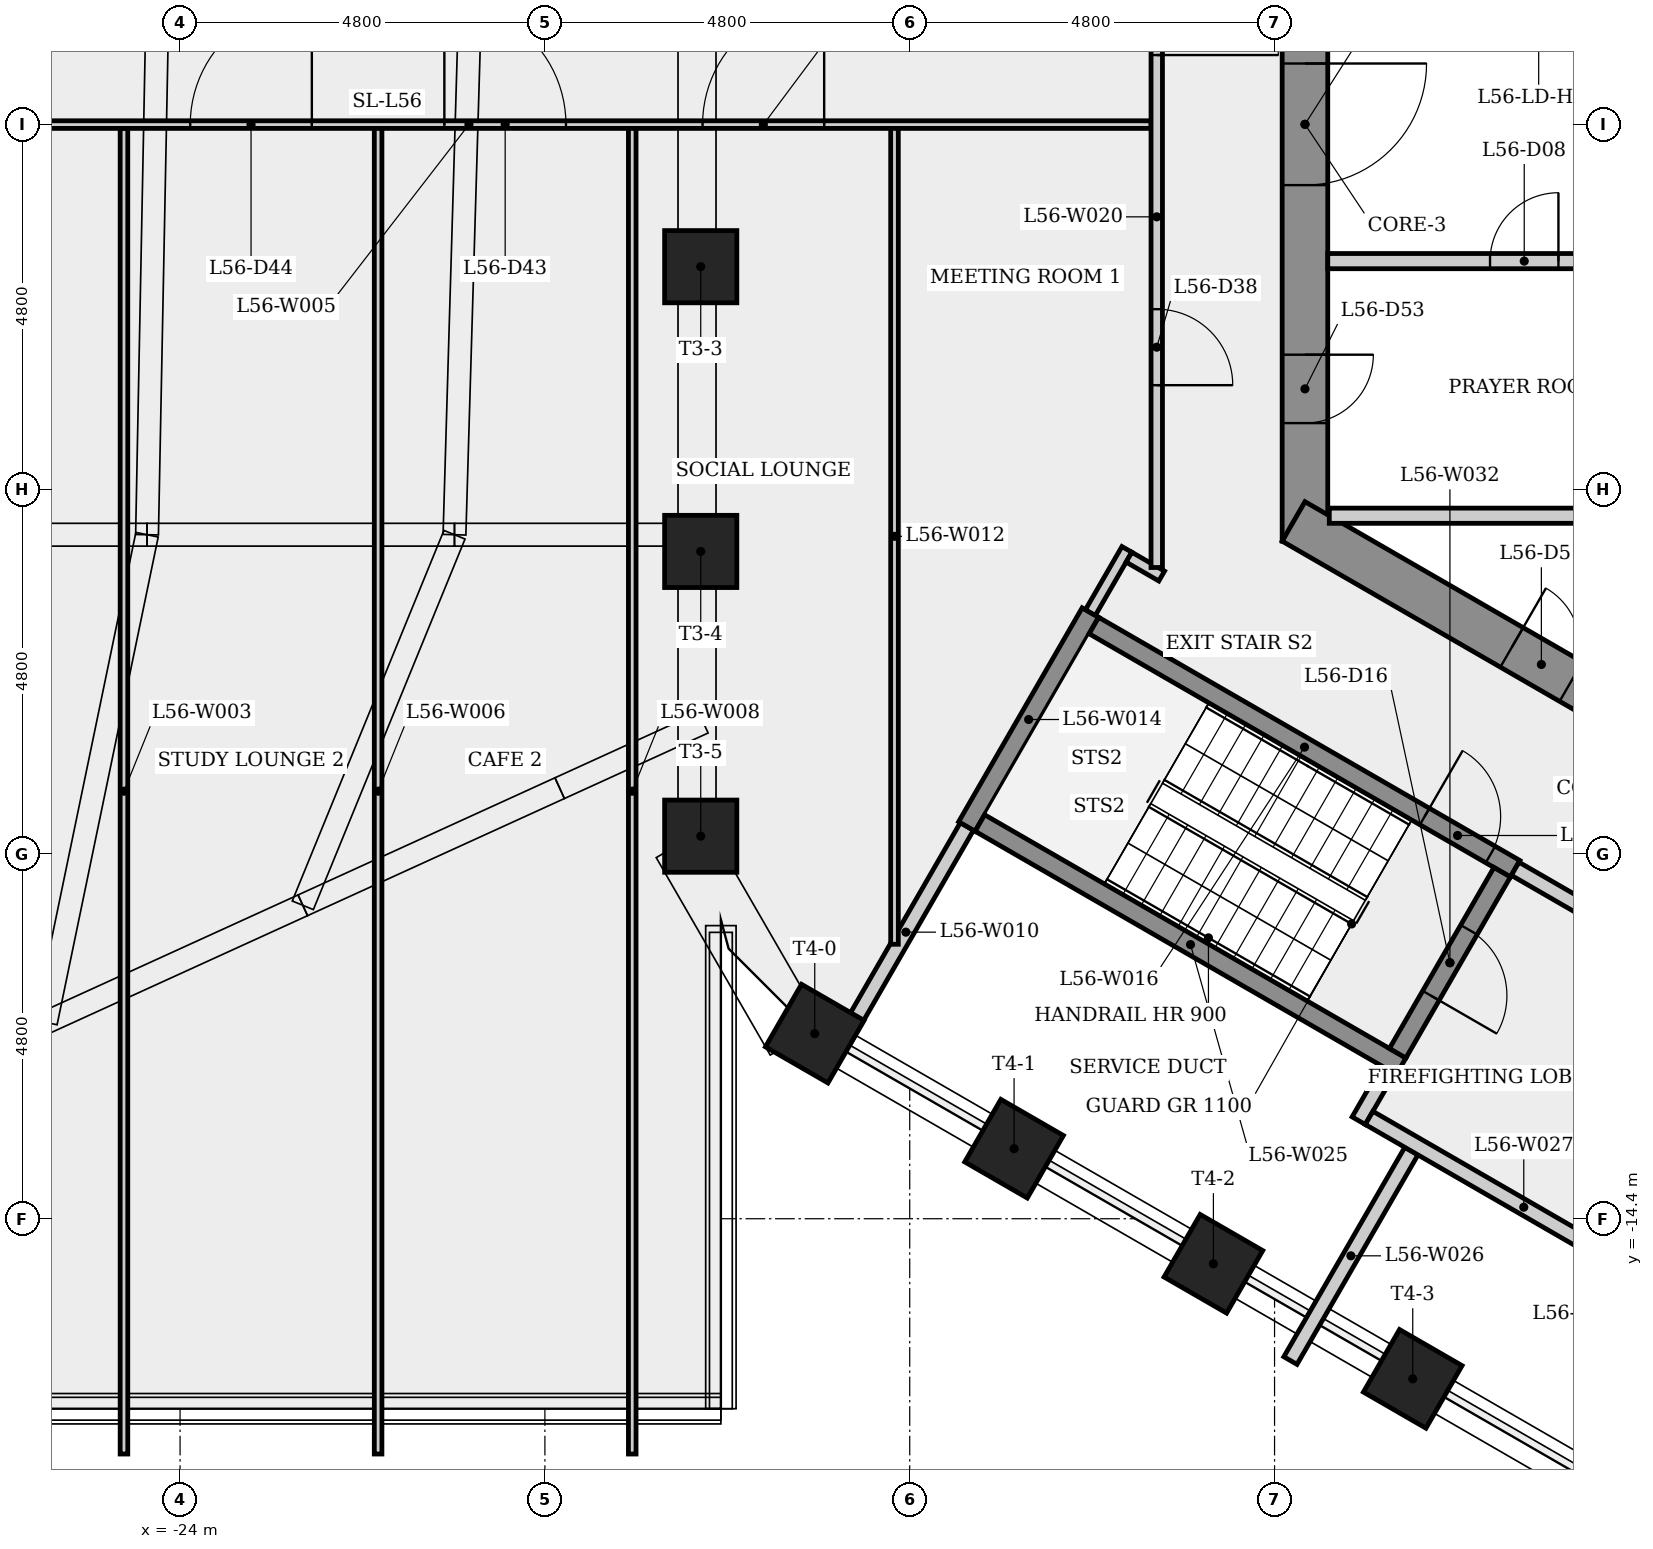
"""IFC4 building model, lengths in metres.
Left out: names, types, materials, properties, quantities, classifications, styles, units other than length and angle.
Written with IfcOpenShell. Run it as: python <this file> out.ifc"""

import sys

from ifc_helpers import new_model, si_unit, direction, frame, frame_2d, origin, origin_2d, place, context, subcontext, project, spatial, rectangle, extrude, element, fill, save


model = new_model("IFC4")
c1 = context("Model", 3, precision=1e-05, world=origin(), true_north=direction((0.0, 1.0)))
c2 = subcontext(c1, "Body", "Model", "MODEL_VIEW")
j1 = project(units=[si_unit("LENGTHUNIT", "METRE"), si_unit("PLANEANGLEUNIT", "RADIAN")], contexts=[c1])
p1 = place(None, origin())
s1 = spatial("IfcSite", under=j1, at=p1, CompositionType="ELEMENT")
p2 = place(p1, origin())
s2 = spatial("IfcBuilding", under=s1, at=p2, CompositionType="ELEMENT")
p3 = place(p2, frame((0.0, 0.0, 210.1)))
s3 = spatial("IfcBuildingStorey", under=s2, at=p3, CompositionType="ELEMENT", Elevation=210.1)
p4 = place(p3, frame((-9.2, 5.485, 0.0), z_axis=(0.0, 0.0, 1.0), x_axis=(0.0, -1.0, 0.0)))
e1 = element("IfcWall", 1, at=p4, inside=s3, PredefinedType="SHEAR", context=c2, shape_type="SweptSolid", body=[
    extrude(rectangle(XDim=10.97, YDim=0.6, at=frame_2d((5.485, 0.0))), origin(), (0.0, 0.0, 1.0), 4.0),
])
p5 = place(p4, frame((8.516, 0.0, 0.0)))
e2 = element("IfcOpeningElement", 2, at=p5, cuts=e1, PredefinedType="OPENING", context=c2, shape_type="SweptSolid", body=[
    extrude(rectangle(XDim=0.9, YDim=2.1, at=frame_2d((0.45, 1.05))), frame((0.0, 0.31, 0.0), z_axis=(0.0, -1.0, 0.0), x_axis=(1.0, 0.0, 0.0)), (0.0, 0.0, 1.0), 0.62),
])
p6 = place(p4, frame((4.685, 0.0, 0.0)))
e3 = element("IfcOpeningElement", 3, at=p6, cuts=e1, PredefinedType="OPENING", context=c2, shape_type="SweptSolid", body=[
    extrude(rectangle(XDim=1.6, YDim=2.1, at=frame_2d((0.8, 1.05))), frame((0.0, 0.31, 0.0), z_axis=(0.0, -1.0, 0.0), x_axis=(1.0, 0.0, 0.0)), (0.0, 0.0, 1.0), 0.62),
])
p7 = place(p3, frame((-9.35, -5.225, 0.0), z_axis=(0.0, 0.0, 1.0), x_axis=(0.866023993627, -0.500002442456, 0.0)))
e4 = element("IfcWall", 4, at=p7, inside=s3, PredefinedType="SHEAR", context=c2, shape_type="SweptSolid", body=[
    extrude(rectangle(XDim=10.97, YDim=0.6, at=frame_2d((5.485, 0.0))), origin(), (0.0, 0.0, 1.0), 4.0),
])
p8 = place(p7, frame((3.315, 0.0, 0.0)))
e5 = element("IfcOpeningElement", 5, at=p8, cuts=e4, PredefinedType="OPENING", context=c2, shape_type="SweptSolid", body=[
    extrude(rectangle(XDim=0.9, YDim=2.1, at=frame_2d((0.45, 1.05))), frame((0.0, 0.31, 0.0), z_axis=(0.0, -1.0, 0.0), x_axis=(1.0, 0.0, 0.0)), (0.0, 0.0, 1.0), 0.62),
])
for number, where, z_axis, x_axis in (
    (6, (-17.15, -1.873, 0.0), (0.0, 0.0, 1.0), (-1.0, 0.0, 0.0)),
    (7, (-17.15, -5.62, 0.0), (0.0, 0.0, 1.0), (-1.0, 0.0, 0.0)),
    (8, (-17.15, -9.366, 0.0), (0.0, 0.0, 1.0), (-1.0, 0.0, 0.0)),
    (9, (-15.65, -11.965, 0.0), (0.0, 0.0, 1.0), (-0.5, -0.866, 0.0)),
    (10, (-13.027, -13.479, 0.0), (0.0, 0.0, 1.0), (-0.5, -0.866, 0.0)),
    (11, (-10.405, -14.993, 0.0), (0.0, 0.0, 1.0), (-0.5, -0.866, 0.0)),
    (12, (-7.782, -16.507, 0.0), (0.0, 0.0, 1.0), (-0.5, -0.866, 0.0)),
    (13, (-5.159, -18.021, 0.0), (0.0, 0.0, 1.0), (-0.5, -0.866, 0.0)),
):
    element("IfcColumn", number, at=place(p3, frame(where, z_axis=z_axis, x_axis=x_axis)), inside=s3, PredefinedType="COLUMN", context=c2, shape_type="SweptSolid", body=[
        extrude(rectangle(XDim=0.95, YDim=0.95, at=origin_2d()), origin(), (0.0, 0.0, 1.0), 4.0),
    ])
p9 = place(p3, frame((-24.738, -17.496, 0.0), z_axis=(0.0, 0.0, 1.0), x_axis=(0.0, 1.0, 0.0)))
e14 = element("IfcWall", 14, at=p9, inside=s3, PredefinedType="PARTITIONING", context=c2, shape_type="SweptSolid", body=[
    extrude(rectangle(XDim=17.442, YDim=0.1, at=frame_2d((8.721, 0.0))), origin(), (0.0, 0.0, 1.0), 3.275),
])
p10 = place(p3, frame((-29.174, -0.004, 0.0), z_axis=(0.0, 0.0, 1.0), x_axis=(1.0, 0.0, 0.0)))
e15 = element("IfcWall", 15, at=p10, inside=s3, PredefinedType="PARTITIONING", context=c2, shape_type="SweptSolid", body=[
    extrude(rectangle(XDim=17.949, YDim=0.1, at=frame_2d((8.975, 0.0))), origin(), (0.0, 0.0, 1.0), 3.6),
])
p11 = place(p10, frame((12.049, 0.0, 0.0)))
e16 = element("IfcOpeningElement", 16, at=p11, cuts=e15, PredefinedType="OPENING", context=c2, shape_type="SweptSolid", body=[
    extrude(rectangle(XDim=1.6, YDim=2.1, at=frame_2d((0.8, 1.05))), frame((0.0, 0.06, 0.0), z_axis=(0.0, -1.0, 0.0), x_axis=(1.0, 0.0, 0.0)), (0.0, 0.0, 1.0), 0.12),
])
p12 = place(p10, frame((8.652, 0.0, 0.0)))
e17 = element("IfcOpeningElement", 17, at=p12, cuts=e15, PredefinedType="OPENING", context=c2, shape_type="SweptSolid", body=[
    extrude(rectangle(XDim=1.6, YDim=2.1, at=frame_2d((0.8, 1.05))), frame((0.0, 0.06, 0.0), z_axis=(0.0, -1.0, 0.0), x_axis=(1.0, 0.0, 0.0)), (0.0, 0.0, 1.0), 0.12),
])
p13 = place(p10, frame((5.308, 0.0, 0.0)))
e18 = element("IfcOpeningElement", 18, at=p13, cuts=e15, PredefinedType="OPENING", context=c2, shape_type="SweptSolid", body=[
    extrude(rectangle(XDim=1.6, YDim=2.1, at=frame_2d((0.8, 1.05))), frame((0.0, 0.06, 0.0), z_axis=(0.0, -1.0, 0.0), x_axis=(1.0, 0.0, 0.0)), (0.0, 0.0, 1.0), 0.12),
])
p14 = place(p10, frame((1.403, 0.0, 0.0)))
e19 = element("IfcOpeningElement", 19, at=p14, cuts=e15, PredefinedType="OPENING", context=c2, shape_type="SweptSolid", body=[
    extrude(rectangle(XDim=1.6, YDim=2.1, at=frame_2d((0.8, 1.05))), frame((0.0, 0.06, 0.0), z_axis=(0.0, -1.0, 0.0), x_axis=(1.0, 0.0, 0.0)), (0.0, 0.0, 1.0), 0.12),
])
for number, where, z_axis, x_axis in (
    (20, (-21.394, -17.496, 0.0), (0.0, 0.0, 1.0), (0.0, 1.0, 0.0)),
    (21, (-18.051, -17.496, 0.0), (0.0, 0.0, 1.0), (0.0, 1.0, 0.0)),
):
    element("IfcWall", number, at=place(p3, frame(where, z_axis=z_axis, x_axis=x_axis)), inside=s3, PredefinedType="PARTITIONING", context=c2, shape_type="SweptSolid", body=[
        extrude(rectangle(XDim=17.442, YDim=0.1, at=frame_2d((8.721, 0.0))), origin(), (0.0, 0.0, 1.0), 3.6),
    ])
p15 = place(p3, frame((-15.254, -12.02, 0.0), z_axis=(0.0, 0.0, 1.0), x_axis=(0.499957148214, 0.866050142861, 0.0)))
e22 = element("IfcWall", 22, at=p15, inside=s3, PredefinedType="PLUMBINGWALL", context=c2, shape_type="SweptSolid", body=[
    extrude(rectangle(XDim=3.212, YDim=0.2, at=frame_2d((1.606, 0.0))), origin(), (0.0, 0.0, 1.0), 3.6),
])
p16 = place(p3, frame((-14.6, -10.789, 0.0), z_axis=(0.0, 0.0, 1.0), x_axis=(0.0, 1.0, 0.0)))
e23 = element("IfcWall", 23, at=p16, inside=s3, PredefinedType="PARTITIONING", context=c2, shape_type="SweptSolid", body=[
    extrude(rectangle(XDim=10.735, YDim=0.1, at=frame_2d((5.368, 0.0))), origin(), (0.0, 0.0, 1.0), 3.6),
])
p17 = place(p3, frame((-13.648, -9.239, 0.0), z_axis=(0.0, 0.0, 1.0), x_axis=(0.500017246033, 0.866015446554, 0.0)))
e24 = element("IfcWall", 24, at=p17, inside=s3, PredefinedType="SHEAR", context=c2, shape_type="SweptSolid", body=[
    extrude(rectangle(XDim=3.25, YDim=0.25, at=frame_2d((1.625, 0.0))), origin(), (0.0, 0.0, 1.0), 3.6),
])
p18 = place(p3, frame((-12.023, -6.424, 0.0), z_axis=(0.0, 0.0, 1.0), x_axis=(0.500023335103, 0.866011930837, 0.0)))
e25 = element("IfcWall", 25, at=p18, inside=s3, PredefinedType="PARTITIONING", context=c2, shape_type="SweptSolid", body=[
    extrude(rectangle(XDim=0.96, YDim=0.15, at=frame_2d((0.48, 0.0))), origin(), (0.0, 0.0, 1.0), 3.6),
])
p19 = place(p3, frame((-11.977, -6.595, 0.0), z_axis=(0.0, 0.0, 1.0), x_axis=(0.866025499775, -0.499999833739, 0.0)))
e26 = element("IfcWall", 26, at=p19, inside=s3, PredefinedType="SHEAR", context=c2, shape_type="SweptSolid", body=[
    extrude(rectangle(XDim=6.4, YDim=0.25, at=frame_2d((3.2, 0.0))), origin(), (0.0, 0.0, 1.0), 3.6),
])
p20 = place(p19, frame((5.025, 0.0, 0.0)))
e27 = element("IfcOpeningElement", 27, at=p20, cuts=e26, PredefinedType="OPENING", context=c2, shape_type="SweptSolid", body=[
    extrude(rectangle(XDim=1.0, YDim=2.1, at=frame_2d((0.5, 1.05))), frame((0.0, 0.135, 0.0), z_axis=(0.0, -1.0, 0.0), x_axis=(1.0, 0.0, 0.0)), (0.0, 0.0, 1.0), 0.27),
])
p21 = place(p3, frame((-11.515, -5.695, 0.0), z_axis=(0.0, 0.0, 1.0), x_axis=(0.865997437773, -0.500048435424, 0.0)))
e28 = element("IfcWall", 28, at=p21, inside=s3, PredefinedType="PARTITIONING", context=c2, shape_type="SweptSolid", body=[
    extrude(rectangle(XDim=0.497, YDim=0.15, at=frame_2d((0.249, 0.0))), origin(), (0.0, 0.0, 1.0), 3.6),
])
p22 = place(p3, frame((-11.15, 3.396, 0.0), z_axis=(0.0, 0.0, 1.0), x_axis=(0.0, -1.0, 0.0)))
e29 = element("IfcWall", 29, at=p22, inside=s3, PredefinedType="PARTITIONING", context=c2, shape_type="SweptSolid", body=[
    extrude(rectangle(XDim=9.228, YDim=0.15, at=frame_2d((4.614, 0.0))), origin(), (0.0, 0.0, 1.0), 3.6),
])
p23 = place(p22, frame((0.885, 0.0, 0.0)))
e30 = element("IfcOpeningElement", 30, at=p23, cuts=e29, PredefinedType="OPENING", context=c2, shape_type="SweptSolid", body=[
    extrude(rectangle(XDim=1.6, YDim=2.1, at=frame_2d((0.8, 1.05))), frame((0.0, 0.085, 0.0), z_axis=(0.0, -1.0, 0.0), x_axis=(1.0, 0.0, 0.0)), (0.0, 0.0, 1.0), 0.17),
])
p24 = place(p22, frame((5.829, 0.0, 0.0)))
e31 = element("IfcOpeningElement", 31, at=p24, cuts=e29, PredefinedType="OPENING", context=c2, shape_type="SweptSolid", body=[
    extrude(rectangle(XDim=1.0, YDim=2.1, at=frame_2d((0.5, 1.05))), frame((0.0, 0.085, 0.0), z_axis=(0.0, -1.0, 0.0), x_axis=(1.0, 0.0, 0.0)), (0.0, 0.0, 1.0), 0.17),
])
p25 = place(p3, frame((-8.88, -5.15, 0.0), z_axis=(0.0, 0.0, 1.0), x_axis=(1.0, 0.0, 0.0)))
e32 = element("IfcWall", 32, at=p25, inside=s3, PredefinedType="PARTITIONING", context=c2, shape_type="SweptSolid", body=[
    extrude(rectangle(XDim=11.205, YDim=0.2, at=frame_2d((5.603, 0.0))), origin(), (0.0, 0.0, 1.0), 3.6),
])
p26 = place(p3, frame((-8.493, -13.11, 0.0), z_axis=(0.0, 0.0, 1.0), x_axis=(0.500067724834, 0.865986299303, 0.0)))
e33 = element("IfcWall", 33, at=p26, inside=s3, PredefinedType="PLUMBINGWALL", context=c2, shape_type="SweptSolid", body=[
    extrude(rectangle(XDim=0.775, YDim=0.2, at=frame_2d((0.388, 0.0))), origin(), (0.0, 0.0, 1.0), 3.6),
])
p27 = place(p3, frame((-7.935, -12.393, 0.0), z_axis=(0.0, 0.0, 1.0), x_axis=(-0.866025499775, 0.499999833739, 0.0)))
e34 = element("IfcWall", 34, at=p27, inside=s3, PredefinedType="SHEAR", context=c2, shape_type="SweptSolid", body=[
    extrude(rectangle(XDim=6.4, YDim=0.25, at=frame_2d((3.2, 0.0))), origin(), (0.0, 0.0, 1.0), 3.6),
])
p28 = place(p3, frame((-7.8, -13.51, 0.0), z_axis=(0.0, 0.0, 1.0), x_axis=(-0.500016846771, -0.866015677078, 0.0)))
e35 = element("IfcWall", 35, at=p28, inside=s3, PredefinedType="PLUMBINGWALL", context=c2, shape_type="SweptSolid", body=[
    extrude(rectangle(XDim=3.183, YDim=0.2, at=frame_2d((1.591, 0.0))), origin(), (0.0, 0.0, 1.0), 3.6),
])
p29 = place(p3, frame((-8.356, -13.073, 0.0), z_axis=(0.0, 0.0, 1.0), x_axis=(0.866038532462, -0.499977259774, 0.0)))
e36 = element("IfcWall", 36, at=p29, inside=s3, PredefinedType="PLUMBINGWALL", context=c2, shape_type="SweptSolid", body=[
    extrude(rectangle(XDim=4.7, YDim=0.2, at=frame_2d((2.35, 0.0))), origin(), (0.0, 0.0, 1.0), 3.6),
])
p30 = place(p3, frame((-6.605, -9.841, 0.0), z_axis=(0.0, 0.0, 1.0), x_axis=(-0.499996545922, -0.866027397988, 0.0)))
e37 = element("IfcWall", 37, at=p30, inside=s3, PredefinedType="SHEAR", context=c2, shape_type="SweptSolid", body=[
    extrude(rectangle(XDim=2.75, YDim=0.25, at=frame_2d((1.375, 0.0))), origin(), (0.0, 0.0, 1.0), 3.6),
])
p31 = place(p30, frame((0.875, 0.0, 0.0)))
e38 = element("IfcOpeningElement", 38, at=p31, cuts=e37, PredefinedType="OPENING", context=c2, shape_type="SweptSolid", body=[
    extrude(rectangle(XDim=1.0, YDim=2.1, at=frame_2d((0.5, 1.05))), frame((0.0, 0.135, 0.0), z_axis=(0.0, -1.0, 0.0), x_axis=(1.0, 0.0, 0.0)), (0.0, 0.0, 1.0), 0.27),
])
p32 = place(p3, frame((-6.435, -9.795, 0.0), z_axis=(0.0, 0.0, 1.0), x_axis=(0.866012907634, -0.500021643343, 0.0)))
e39 = element("IfcWall", 39, at=p32, inside=s3, PredefinedType="PARTITIONING", context=c2, shape_type="SweptSolid", body=[
    extrude(rectangle(XDim=4.45, YDim=0.2, at=frame_2d((2.225, 0.0))), origin(), (0.0, 0.0, 1.0), 3.6),
])
p33 = place(p32, frame((1.675, 0.0, 0.0)))
e40 = element("IfcOpeningElement", 40, at=p33, cuts=e39, PredefinedType="OPENING", context=c2, shape_type="SweptSolid", body=[
    extrude(rectangle(XDim=1.1, YDim=2.1, at=frame_2d((0.55, 1.05))), frame((0.0, 0.11, 0.0), z_axis=(0.0, -1.0, 0.0), x_axis=(1.0, 0.0, 0.0)), (0.0, 0.0, 1.0), 0.22),
])
p34 = place(p3, frame((-8.9, -1.8, 0.0), z_axis=(0.0, 0.0, 1.0), x_axis=(1.0, 0.0, 0.0)))
e41 = element("IfcWall", 41, at=p34, inside=s3, PredefinedType="PARTITIONING", context=c2, shape_type="SweptSolid", body=[
    extrude(rectangle(XDim=11.225, YDim=0.2, at=frame_2d((5.613, 0.0))), origin(), (0.0, 0.0, 1.0), 3.6),
])
p35 = place(p34, frame((2.135, 0.0, 0.0)))
e42 = element("IfcOpeningElement", 42, at=p35, cuts=e41, PredefinedType="OPENING", context=c2, shape_type="SweptSolid", body=[
    extrude(rectangle(XDim=0.9, YDim=2.1, at=frame_2d((0.45, 1.05))), frame((0.0, 0.11, 0.0), z_axis=(0.0, -1.0, 0.0), x_axis=(1.0, 0.0, 0.0)), (0.0, 0.0, 1.0), 0.22),
])
p36 = place(p34, frame((6.61, 0.0, 0.0)))
e43 = element("IfcOpeningElement", 43, at=p36, cuts=e41, PredefinedType="OPENING", context=c2, shape_type="SweptSolid", body=[
    extrude(rectangle(XDim=0.9, YDim=2.1, at=frame_2d((0.45, 1.05))), frame((0.0, 0.11, 0.0), z_axis=(0.0, -1.0, 0.0), x_axis=(1.0, 0.0, 0.0)), (0.0, 0.0, 1.0), 0.22),
])
p37 = place(p34, frame((9.613, 0.0, 0.0)))
e44 = element("IfcOpeningElement", 44, at=p37, cuts=e41, PredefinedType="OPENING", context=c2, shape_type="SweptSolid", body=[
    extrude(rectangle(XDim=0.9, YDim=2.1, at=frame_2d((0.45, 1.05))), frame((0.0, 0.11, 0.0), z_axis=(0.0, -1.0, 0.0), x_axis=(1.0, 0.0, 0.0)), (0.0, 0.0, 1.0), 0.22),
])
p38 = place(p35, origin())
e45 = element("IfcDoor", 45, at=p38, inside=s3, OperationType="SINGLE_SWING_RIGHT", PredefinedType="DOOR", context=c2, shape_type="SweptSolid", body=[
    extrude(rectangle(XDim=0.9, YDim=2.1, at=frame_2d((0.45, 1.05))), frame((0.0, 0.025, 0.0), z_axis=(0.0, -1.0, 0.0), x_axis=(1.0, 0.0, 0.0)), (0.0, 0.0, 1.0), 0.05),
])
fill(e42, e45)
p39 = place(p20, origin())
e46 = element("IfcDoor", 46, at=p39, inside=s3, OperationType="SINGLE_SWING_LEFT", PredefinedType="DOOR", context=c2, shape_type="SweptSolid", body=[
    extrude(rectangle(XDim=1.0, YDim=2.1, at=frame_2d((0.5, 1.05))), frame((0.0, 0.025, 0.0), z_axis=(0.0, -1.0, 0.0), x_axis=(1.0, 0.0, 0.0)), (0.0, 0.0, 1.0), 0.05),
])
fill(e27, e46)
p40 = place(p31, origin())
e47 = element("IfcDoor", 47, at=p40, inside=s3, OperationType="SINGLE_SWING_RIGHT", PredefinedType="DOOR", context=c2, shape_type="SweptSolid", body=[
    extrude(rectangle(XDim=1.0, YDim=2.1, at=frame_2d((0.5, 1.05))), frame((0.0, 0.025, 0.0), z_axis=(0.0, -1.0, 0.0), x_axis=(1.0, 0.0, 0.0)), (0.0, 0.0, 1.0), 0.05),
])
fill(e38, e47)
p41 = place(p23, origin())
e48 = element("IfcDoor", 48, at=p41, inside=s3, OperationType="SINGLE_SWING_RIGHT", PredefinedType="DOOR", context=c2, shape_type="SweptSolid", body=[
    extrude(rectangle(XDim=1.6, YDim=2.1, at=frame_2d((0.8, 1.05))), frame((0.0, 0.025, 0.0), z_axis=(0.0, -1.0, 0.0), x_axis=(1.0, 0.0, 0.0)), (0.0, 0.0, 1.0), 0.05),
])
fill(e30, e48)
p42 = place(p24, origin())
e49 = element("IfcDoor", 49, at=p42, inside=s3, OperationType="SINGLE_SWING_RIGHT", PredefinedType="DOOR", context=c2, shape_type="SweptSolid", body=[
    extrude(rectangle(XDim=1.0, YDim=2.1, at=frame_2d((0.5, 1.05))), frame((0.0, 0.025, 0.0), z_axis=(0.0, -1.0, 0.0), x_axis=(1.0, 0.0, 0.0)), (0.0, 0.0, 1.0), 0.05),
])
fill(e31, e49)
p43 = place(p11, origin())
e50 = element("IfcDoor", 50, at=p43, inside=s3, OperationType="SINGLE_SWING_RIGHT", PredefinedType="DOOR", context=c2, shape_type="SweptSolid", body=[
    extrude(rectangle(XDim=1.6, YDim=2.1, at=frame_2d((0.8, 1.05))), frame((0.0, 0.025, 0.0), z_axis=(0.0, -1.0, 0.0), x_axis=(1.0, 0.0, 0.0)), (0.0, 0.0, 1.0), 0.05),
])
fill(e16, e50)
p44 = place(p12, origin())
e51 = element("IfcDoor", 51, at=p44, inside=s3, OperationType="SINGLE_SWING_LEFT", PredefinedType="DOOR", context=c2, shape_type="SweptSolid", body=[
    extrude(rectangle(XDim=1.6, YDim=2.1, at=frame_2d((0.8, 1.05))), frame((0.0, 0.025, 0.0), z_axis=(0.0, -1.0, 0.0), x_axis=(1.0, 0.0, 0.0)), (0.0, 0.0, 1.0), 0.05),
])
fill(e17, e51)
p45 = place(p13, origin())
e52 = element("IfcDoor", 52, at=p45, inside=s3, OperationType="SINGLE_SWING_RIGHT", PredefinedType="DOOR", context=c2, shape_type="SweptSolid", body=[
    extrude(rectangle(XDim=1.6, YDim=2.1, at=frame_2d((0.8, 1.05))), frame((0.0, 0.025, 0.0), z_axis=(0.0, -1.0, 0.0), x_axis=(1.0, 0.0, 0.0)), (0.0, 0.0, 1.0), 0.05),
])
fill(e18, e52)
p46 = place(p8, origin())
e53 = element("IfcDoor", 53, at=p46, inside=s3, OperationType="SINGLE_SWING_LEFT", PredefinedType="DOOR", context=c2, shape_type="SweptSolid", body=[
    extrude(rectangle(XDim=0.9, YDim=2.1, at=frame_2d((0.45, 1.05))), frame((0.0, 0.025, 0.0), z_axis=(0.0, -1.0, 0.0), x_axis=(1.0, 0.0, 0.0)), (0.0, 0.0, 1.0), 0.05),
])
fill(e5, e53)
p47 = place(p5, origin())
e54 = element("IfcDoor", 54, at=p47, inside=s3, OperationType="SINGLE_SWING_LEFT", PredefinedType="DOOR", context=c2, shape_type="SweptSolid", body=[
    extrude(rectangle(XDim=0.9, YDim=2.1, at=frame_2d((0.45, 1.05))), frame((0.0, 0.025, 0.0), z_axis=(0.0, -1.0, 0.0), x_axis=(1.0, 0.0, 0.0)), (0.0, 0.0, 1.0), 0.05),
])
fill(e2, e54)
p48 = place(p6, origin())
e55 = element("IfcDoor", 55, at=p48, inside=s3, OperationType="SINGLE_SWING_LEFT", PredefinedType="DOOR", context=c2, shape_type="SweptSolid", body=[
    extrude(rectangle(XDim=1.6, YDim=2.1, at=frame_2d((0.8, 1.05))), frame((0.0, 0.025, 0.0), z_axis=(0.0, -1.0, 0.0), x_axis=(1.0, 0.0, 0.0)), (0.0, 0.0, 1.0), 0.05),
])
fill(e3, e55)
save(model, sys.argv[1])
